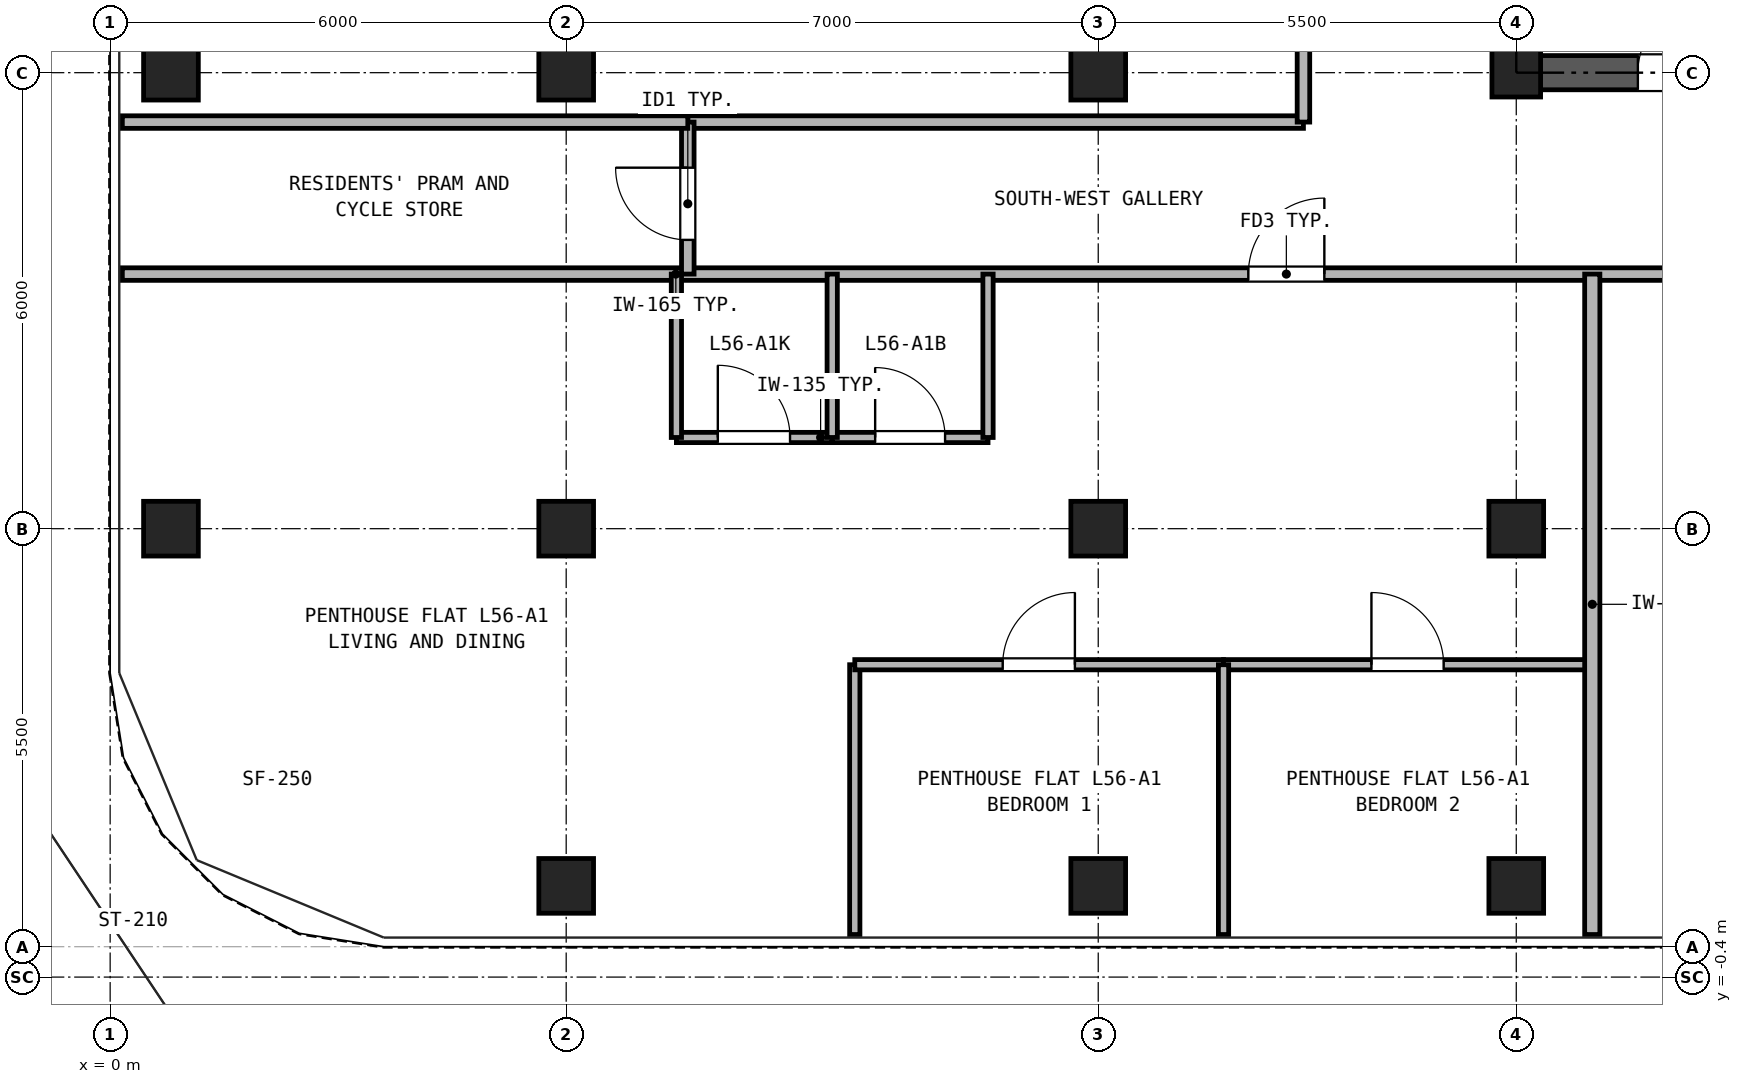
"""IFC4 building model, lengths in metres.
Left out: names, types, materials, properties, quantities, classifications, styles, units other than length and angle.
Written with IfcOpenShell. Run it as: python <this file> out.ifc"""

import sys

from ifc_helpers import new_model, si_unit, direction, frame, frame_2d, origin, origin_2d, place, context, subcontext, project, spatial, rectangle, hollow_rectangle, extrude, source, transform, mapped, element, fill, save


model = new_model("IFC4")
c1 = context("Model", 3, precision=1e-05, world=origin(), true_north=direction((0.0, 1.0)))
c2 = subcontext(c1, "Body", "Model", "MODEL_VIEW")
j1 = project(units=[si_unit("LENGTHUNIT", "METRE"), si_unit("PLANEANGLEUNIT", "RADIAN")], contexts=[c1])
p1 = place(None, origin())
s1 = spatial("IfcSite", under=j1, at=p1, CompositionType="ELEMENT")
p2 = place(p1, origin())
s2 = spatial("IfcBuilding", under=s1, at=p2, CompositionType="ELEMENT")
p3 = place(p2, frame((0.0, 0.0, 199.6)))
s3 = spatial("IfcBuildingStorey", under=s2, at=p3, CompositionType="ELEMENT", Elevation=199.6)
m1 = source(origin(), c2, "Body", "SweptSolid", [
    extrude(hollow_rectangle(XDim=0.72, YDim=0.72, WallThickness=0.04, at=origin_2d()), origin(), (0.0, 0.0, 1.0), 2.95),
])
for number, where, z_axis, x_axis in (
    (1, (6.0, 0.8, 0.0), (0.0, 0.0, 1.0), (1.0, 0.0, 0.0)),
    (2, (13.0, 0.8, 0.0), (0.0, 0.0, 1.0), (1.0, 0.0, 0.0)),
    (3, (18.5, 0.8, 0.0), (0.0, 0.0, 1.0), (1.0, 0.0, 0.0)),
    (4, (0.8, 5.5, 0.0), (0.0, 0.0, 1.0), (1.0, 0.0, 0.0)),
    (5, (0.8, 11.5, 0.0), (0.0, 0.0, 1.0), (1.0, 0.0, 0.0)),
    (6, (6.0, 5.5, 0.0), (0.0, 0.0, 1.0), (1.0, 0.0, 0.0)),
    (7, (6.0, 11.5, 0.0), (0.0, 0.0, 1.0), (1.0, 0.0, 0.0)),
    (8, (13.0, 5.5, 0.0), (0.0, 0.0, 1.0), (1.0, 0.0, 0.0)),
    (9, (13.0, 11.5, 0.0), (0.0, 0.0, 1.0), (1.0, 0.0, 0.0)),
    (10, (18.5, 5.5, 0.0), (0.0, 0.0, 1.0), (1.0, 0.0, 0.0)),
):
    element("IfcColumn", number, at=place(p3, frame(where, z_axis=z_axis, x_axis=x_axis)), inside=s3, PredefinedType="COLUMN", context=c2, shape_type="MappedRepresentation", body=[
        mapped(m1, transform((0.0, 0.0, 0.0), x_axis=(1.0, 0.0, 0.0), y_axis=(0.0, 1.0, 0.0), z_axis=(0.0, 0.0, 1.0), scale=1.0)),
    ])
m2 = source(origin(), c2, "Body", "SweptSolid", [
    extrude(hollow_rectangle(XDim=0.64, YDim=0.64, WallThickness=0.035, at=origin_2d()), origin(), (0.0, 0.0, 1.0), 2.95),
])
p4 = place(p3, frame((18.5, 11.5, 0.0), z_axis=(0.0, 0.0, 1.0), x_axis=(1.0, 0.0, 0.0)))
e11 = element("IfcColumn", 11, at=p4, inside=s3, PredefinedType="COLUMN", context=c2, shape_type="MappedRepresentation", body=[
    mapped(m2, transform((0.0, 0.0, 0.0), x_axis=(1.0, 0.0, 0.0), y_axis=(0.0, 1.0, 0.0), z_axis=(0.0, 0.0, 1.0), scale=1.0)),
])
p5 = place(p3, frame((18.275, 11.5, 0.0), z_axis=(0.0, 0.0, 1.0), x_axis=(1.0, 0.0, 0.0)))
e12 = element("IfcWall", 12, at=p5, inside=s3, PredefinedType="SHEAR", context=c2, shape_type="SweptSolid", body=[
    extrude(rectangle(XDim=10.45, YDim=0.45, at=frame_2d((5.225, 0.0))), origin(), (0.0, 0.0, 1.0), 2.95),
])
p6 = place(p5, frame((1.825, 0.0, 0.0)))
e13 = element("IfcOpeningElement", 13, at=p6, cuts=e12, PredefinedType="OPENING", context=c2, shape_type="SweptSolid", body=[
    extrude(rectangle(XDim=0.95, YDim=2.15, at=frame_2d((0.475, 1.075))), frame((0.0, 0.235, 0.0), z_axis=(0.0, -1.0, 0.0), x_axis=(1.0, 0.0, 0.0)), (0.0, 0.0, 1.0), 0.47),
])
p7 = place(p5, frame((5.325, 0.0, 0.0)))
e14 = element("IfcOpeningElement", 14, at=p7, cuts=e12, PredefinedType="OPENING", context=c2, shape_type="SweptSolid", body=[
    extrude(rectangle(XDim=0.95, YDim=2.15, at=frame_2d((0.475, 1.075))), frame((0.0, 0.235, 0.0), z_axis=(0.0, -1.0, 0.0), x_axis=(1.0, 0.0, 0.0)), (0.0, 0.0, 1.0), 0.47),
])
p8 = place(p5, frame((8.225, 0.0, 0.0)))
e15 = element("IfcOpeningElement", 15, at=p8, cuts=e12, PredefinedType="OPENING", context=c2, shape_type="SweptSolid", body=[
    extrude(rectangle(XDim=1.1, YDim=2.25, at=frame_2d((0.55, 1.125))), frame((0.0, 0.235, 0.0), z_axis=(0.0, -1.0, 0.0), x_axis=(1.0, 0.0, 0.0)), (0.0, 0.0, 1.0), 0.47),
])
p9 = place(p3, frame((18.5, 11.725, 0.0), z_axis=(0.0, 0.0, 1.0), x_axis=(0.0, 1.0, 0.0)))
e16 = element("IfcWall", 16, at=p9, inside=s3, PredefinedType="SHEAR", context=c2, shape_type="SweptSolid", body=[
    extrude(rectangle(XDim=16.8, YDim=0.45, at=frame_2d((8.4, 0.0))), origin(), (0.0, 0.0, 1.0), 2.95),
])
p10 = place(p9, frame((7.425, 0.0, 0.0)))
e17 = element("IfcOpeningElement", 17, at=p10, cuts=e16, PredefinedType="OPENING", context=c2, shape_type="SweptSolid", body=[
    extrude(rectangle(XDim=1.15, YDim=2.2, at=frame_2d((0.575, 1.1))), frame((0.0, 0.235, 0.0), z_axis=(0.0, -1.0, 0.0), x_axis=(1.0, 0.0, 0.0)), (0.0, 0.0, 1.0), 0.47),
])
p11 = place(p3, frame((0.16, 8.85, 0.0), z_axis=(0.0, 0.0, 1.0), x_axis=(1.0, 0.0, 0.0)))
e18 = element("IfcWall", 18, at=p11, inside=s3, PredefinedType="PARTITIONING", context=c2, shape_type="SweptSolid", body=[
    extrude(rectangle(XDim=41.48, YDim=0.165, at=frame_2d((20.74, 0.0))), origin(), (0.0, 0.0, 1.0), 2.95),
])
p12 = place(p11, frame((14.815, 0.0, 0.0)))
e19 = element("IfcOpeningElement", 19, at=p12, cuts=e18, PredefinedType="OPENING", context=c2, shape_type="SweptSolid", body=[
    extrude(rectangle(XDim=1.0, YDim=2.15, at=frame_2d((0.5, 1.075))), frame((0.0, 0.093, 0.0), z_axis=(0.0, -1.0, 0.0), x_axis=(1.0, 0.0, 0.0)), (0.0, 0.0, 1.0), 0.185),
])
p13 = place(p11, frame((28.315, 0.0, 0.0)))
e20 = element("IfcOpeningElement", 20, at=p13, cuts=e18, PredefinedType="OPENING", context=c2, shape_type="SweptSolid", body=[
    extrude(rectangle(XDim=1.0, YDim=2.15, at=frame_2d((0.5, 1.075))), frame((0.0, 0.093, 0.0), z_axis=(0.0, -1.0, 0.0), x_axis=(1.0, 0.0, 0.0)), (0.0, 0.0, 1.0), 0.185),
])
p14 = place(p11, frame((32.615, 0.0, 0.0)))
e21 = element("IfcOpeningElement", 21, at=p14, cuts=e18, PredefinedType="OPENING", context=c2, shape_type="SweptSolid", body=[
    extrude(rectangle(XDim=1.0, YDim=2.15, at=frame_2d((0.5, 1.075))), frame((0.0, 0.093, 0.0), z_axis=(0.0, -1.0, 0.0), x_axis=(1.0, 0.0, 0.0)), (0.0, 0.0, 1.0), 0.185),
])
p15 = place(p3, frame((7.6, 10.85, 0.0), z_axis=(0.0, 0.0, 1.0), x_axis=(1.0, 0.0, 0.0)))
e22 = element("IfcWall", 22, at=p15, inside=s3, PredefinedType="PARTITIONING", context=c2, shape_type="SweptSolid", body=[
    extrude(rectangle(XDim=8.1, YDim=0.165, at=frame_2d((4.05, 0.0))), origin(), (0.0, 0.0, 1.0), 2.95),
])
p16 = place(p3, frame((7.6, 8.85, 0.0), z_axis=(0.0, 0.0, 1.0), x_axis=(0.0, 1.0, 0.0)))
e23 = element("IfcWall", 23, at=p16, inside=s3, PredefinedType="PARTITIONING", context=c2, shape_type="SweptSolid", body=[
    extrude(rectangle(XDim=2.0, YDim=0.165, at=frame_2d((1.0, 0.0))), origin(), (0.0, 0.0, 1.0), 2.95),
])
p17 = place(p16, frame((0.45, 0.0, 0.0)))
e24 = element("IfcOpeningElement", 24, at=p17, cuts=e23, PredefinedType="OPENING", context=c2, shape_type="SweptSolid", body=[
    extrude(rectangle(XDim=0.95, YDim=2.15, at=frame_2d((0.475, 1.075))), frame((0.0, 0.093, 0.0), z_axis=(0.0, -1.0, 0.0), x_axis=(1.0, 0.0, 0.0)), (0.0, 0.0, 1.0), 0.185),
])
p18 = place(p3, frame((15.7, 10.85, 0.0), z_axis=(0.0, 0.0, 1.0), x_axis=(0.0, 1.0, 0.0)))
e25 = element("IfcWall", 25, at=p18, inside=s3, PredefinedType="PARTITIONING", context=c2, shape_type="SweptSolid", body=[
    extrude(rectangle(XDim=24.29, YDim=0.165, at=frame_2d((12.145, 0.0))), origin(), (0.0, 0.0, 1.0), 2.95),
])
p19 = place(p18, frame((2.825, 0.0, 0.0)))
e26 = element("IfcOpeningElement", 26, at=p19, cuts=e25, PredefinedType="OPENING", context=c2, shape_type="SweptSolid", body=[
    extrude(rectangle(XDim=0.95, YDim=2.15, at=frame_2d((0.475, 1.075))), frame((0.0, 0.093, 0.0), z_axis=(0.0, -1.0, 0.0), x_axis=(1.0, 0.0, 0.0)), (0.0, 0.0, 1.0), 0.185),
])
p20 = place(p18, frame((9.15, 0.0, 0.0)))
e27 = element("IfcOpeningElement", 27, at=p20, cuts=e25, PredefinedType="OPENING", context=c2, shape_type="SweptSolid", body=[
    extrude(rectangle(XDim=0.95, YDim=2.15, at=frame_2d((0.475, 1.075))), frame((0.0, 0.093, 0.0), z_axis=(0.0, -1.0, 0.0), x_axis=(1.0, 0.0, 0.0)), (0.0, 0.0, 1.0), 0.185),
])
p21 = place(p18, frame((15.15, 0.0, 0.0)))
e28 = element("IfcOpeningElement", 28, at=p21, cuts=e25, PredefinedType="OPENING", context=c2, shape_type="SweptSolid", body=[
    extrude(rectangle(XDim=0.95, YDim=2.15, at=frame_2d((0.475, 1.075))), frame((0.0, 0.093, 0.0), z_axis=(0.0, -1.0, 0.0), x_axis=(1.0, 0.0, 0.0)), (0.0, 0.0, 1.0), 0.185),
])
p22 = place(p18, frame((20.97, 0.0, 0.0)))
e29 = element("IfcOpeningElement", 29, at=p22, cuts=e25, PredefinedType="OPENING", context=c2, shape_type="SweptSolid", body=[
    extrude(rectangle(XDim=0.95, YDim=2.15, at=frame_2d((0.475, 1.075))), frame((0.0, 0.093, 0.0), z_axis=(0.0, -1.0, 0.0), x_axis=(1.0, 0.0, 0.0)), (0.0, 0.0, 1.0), 0.185),
])
p23 = place(p3, frame((7.45, 6.7, 0.0), z_axis=(0.0, 0.0, 1.0), x_axis=(1.0, 0.0, 0.0)))
e30 = element("IfcWall", 30, at=p23, inside=s3, PredefinedType="PARTITIONING", context=c2, shape_type="SweptSolid", body=[
    extrude(rectangle(XDim=2.05, YDim=0.135, at=frame_2d((1.025, 0.0))), origin(), (0.0, 0.0, 1.0), 2.95),
])
p24 = place(p23, frame((0.545, 0.0, 0.0)))
e31 = element("IfcOpeningElement", 31, at=p24, cuts=e30, PredefinedType="OPENING", context=c2, shape_type="SweptSolid", body=[
    extrude(rectangle(XDim=0.95, YDim=2.15, at=frame_2d((0.475, 1.075))), frame((0.0, 0.077, 0.0), z_axis=(0.0, -1.0, 0.0), x_axis=(1.0, 0.0, 0.0)), (0.0, 0.0, 1.0), 0.155),
])
p25 = place(p3, frame((9.5, 6.7, 0.0), z_axis=(0.0, 0.0, 1.0), x_axis=(1.0, 0.0, 0.0)))
e32 = element("IfcWall", 32, at=p25, inside=s3, PredefinedType="PARTITIONING", context=c2, shape_type="SweptSolid", body=[
    extrude(rectangle(XDim=2.05, YDim=0.135, at=frame_2d((1.025, 0.0))), origin(), (0.0, 0.0, 1.0), 2.95),
])
p26 = place(p25, frame((0.565, 0.0, 0.0)))
e33 = element("IfcOpeningElement", 33, at=p26, cuts=e32, PredefinedType="OPENING", context=c2, shape_type="SweptSolid", body=[
    extrude(rectangle(XDim=0.92, YDim=2.1, at=frame_2d((0.46, 1.05))), frame((0.0, 0.077, 0.0), z_axis=(0.0, -1.0, 0.0), x_axis=(1.0, 0.0, 0.0)), (0.0, 0.0, 1.0), 0.155),
])
for number, where, z_axis, x_axis in (
    (34, (7.45, 6.7, 0.0), (0.0, 0.0, 1.0), (0.0, 1.0, 0.0)),
    (35, (9.5, 6.7, 0.0), (0.0, 0.0, 1.0), (0.0, 1.0, 0.0)),
    (36, (11.55, 6.7, 0.0), (0.0, 0.0, 1.0), (0.0, 1.0, 0.0)),
):
    element("IfcWall", number, at=place(p3, frame(where, z_axis=z_axis, x_axis=x_axis)), inside=s3, PredefinedType="PARTITIONING", context=c2, shape_type="SweptSolid", body=[
        extrude(rectangle(XDim=2.15, YDim=0.135, at=frame_2d((1.075, 0.0))), origin(), (0.0, 0.0, 1.0), 2.95),
    ])
p27 = place(p3, frame((9.797, 0.16, 0.0), z_axis=(0.0, 0.0, 1.0), x_axis=(0.0, 1.0, 0.0)))
e37 = element("IfcWall", 37, at=p27, inside=s3, PredefinedType="PARTITIONING", context=c2, shape_type="SweptSolid", body=[
    extrude(rectangle(XDim=3.55, YDim=0.135, at=frame_2d((1.775, 0.0))), origin(), (0.0, 0.0, 1.0), 2.95),
])
p28 = place(p3, frame((9.797, 3.71, 0.0), z_axis=(0.0, 0.0, 1.0), x_axis=(1.0, 0.0, 0.0)))
e38 = element("IfcWall", 38, at=p28, inside=s3, PredefinedType="PARTITIONING", context=c2, shape_type="SweptSolid", body=[
    extrude(rectangle(XDim=4.851, YDim=0.135, at=frame_2d((2.426, 0.0))), origin(), (0.0, 0.0, 1.0), 2.95),
])
p29 = place(p28, frame((1.946, 0.0, 0.0)))
e39 = element("IfcOpeningElement", 39, at=p29, cuts=e38, PredefinedType="OPENING", context=c2, shape_type="SweptSolid", body=[
    extrude(rectangle(XDim=0.95, YDim=2.15, at=frame_2d((0.475, 1.075))), frame((0.0, 0.077, 0.0), z_axis=(0.0, -1.0, 0.0), x_axis=(1.0, 0.0, 0.0)), (0.0, 0.0, 1.0), 0.155),
])
p30 = place(p3, frame((14.648, 3.71, 0.0), z_axis=(0.0, 0.0, 1.0), x_axis=(1.0, 0.0, 0.0)))
e40 = element("IfcWall", 40, at=p30, inside=s3, PredefinedType="PARTITIONING", context=c2, shape_type="SweptSolid", body=[
    extrude(rectangle(XDim=4.852, YDim=0.135, at=frame_2d((2.426, 0.0))), origin(), (0.0, 0.0, 1.0), 2.95),
])
p31 = place(p30, frame((1.946, 0.0, 0.0)))
e41 = element("IfcOpeningElement", 41, at=p31, cuts=e40, PredefinedType="OPENING", context=c2, shape_type="SweptSolid", body=[
    extrude(rectangle(XDim=0.95, YDim=2.15, at=frame_2d((0.475, 1.075))), frame((0.0, 0.077, 0.0), z_axis=(0.0, -1.0, 0.0), x_axis=(1.0, 0.0, 0.0)), (0.0, 0.0, 1.0), 0.155),
])
p32 = place(p3, frame((14.648, 0.16, 0.0), z_axis=(0.0, 0.0, 1.0), x_axis=(0.0, 1.0, 0.0)))
e42 = element("IfcWall", 42, at=p32, inside=s3, PredefinedType="PARTITIONING", context=c2, shape_type="SweptSolid", body=[
    extrude(rectangle(XDim=3.55, YDim=0.135, at=frame_2d((1.775, 0.0))), origin(), (0.0, 0.0, 1.0), 2.95),
])
p33 = place(p3, frame((19.5, 0.16, 0.0), z_axis=(0.0, 0.0, 1.0), x_axis=(0.0, 1.0, 0.0)))
e43 = element("IfcWall", 43, at=p33, inside=s3, PredefinedType="PARTITIONING", context=c2, shape_type="SweptSolid", body=[
    extrude(rectangle(XDim=8.69, YDim=0.2, at=frame_2d((4.345, 0.0))), origin(), (0.0, 0.0, 1.0), 2.95),
])
p34 = place(p3, frame((0.16, 10.85, 0.0), z_axis=(0.0, 0.0, 1.0), x_axis=(1.0, 0.0, 0.0)))
e44 = element("IfcWall", 44, at=p34, inside=s3, PredefinedType="PARTITIONING", context=c2, shape_type="SweptSolid", body=[
    extrude(rectangle(XDim=7.44, YDim=0.165, at=frame_2d((3.72, 0.0))), origin(), (0.0, 0.0, 1.0), 2.95),
])
p35 = place(p6, frame((0.95, 0.0, 0.0), z_axis=(0.0, 0.0, 1.0), x_axis=(-1.0, 0.0, 0.0)))
e45 = element("IfcDoor", 45, at=p35, inside=s3, OperationType="SINGLE_SWING_RIGHT", PredefinedType="DOOR", context=c2, shape_type="SweptSolid", body=[
    extrude(rectangle(XDim=0.95, YDim=2.15, at=frame_2d((0.475, 1.075))), frame((0.0, 0.025, 0.0), z_axis=(0.0, -1.0, 0.0), x_axis=(1.0, 0.0, 0.0)), (0.0, 0.0, 1.0), 0.05),
])
fill(e13, e45)
p36 = place(p24, origin())
e46 = element("IfcDoor", 46, at=p36, inside=s3, OperationType="SINGLE_SWING_LEFT", PredefinedType="DOOR", context=c2, shape_type="SweptSolid", body=[
    extrude(rectangle(XDim=0.95, YDim=2.15, at=frame_2d((0.475, 1.075))), frame((0.0, 0.025, 0.0), z_axis=(0.0, -1.0, 0.0), x_axis=(1.0, 0.0, 0.0)), (0.0, 0.0, 1.0), 0.05),
])
fill(e31, e46)
p37 = place(p26, origin())
e47 = element("IfcDoor", 47, at=p37, inside=s3, OperationType="SINGLE_SWING_LEFT", PredefinedType="DOOR", context=c2, shape_type="SweptSolid", body=[
    extrude(rectangle(XDim=0.92, YDim=2.1, at=frame_2d((0.46, 1.05))), frame((0.0, 0.025, 0.0), z_axis=(0.0, -1.0, 0.0), x_axis=(1.0, 0.0, 0.0)), (0.0, 0.0, 1.0), 0.05),
])
fill(e33, e47)
p38 = place(p29, frame((0.95, 0.0, 0.0), z_axis=(0.0, 0.0, 1.0), x_axis=(-1.0, 0.0, 0.0)))
e48 = element("IfcDoor", 48, at=p38, inside=s3, OperationType="SINGLE_SWING_RIGHT", PredefinedType="DOOR", context=c2, shape_type="SweptSolid", body=[
    extrude(rectangle(XDim=0.95, YDim=2.15, at=frame_2d((0.475, 1.075))), frame((0.0, 0.025, 0.0), z_axis=(0.0, -1.0, 0.0), x_axis=(1.0, 0.0, 0.0)), (0.0, 0.0, 1.0), 0.05),
])
fill(e39, e48)
p39 = place(p31, frame((0.95, 0.0, 0.0), z_axis=(0.0, 0.0, 1.0), x_axis=(-1.0, 0.0, 0.0)))
e49 = element("IfcDoor", 49, at=p39, inside=s3, OperationType="SINGLE_SWING_LEFT", PredefinedType="DOOR", context=c2, shape_type="SweptSolid", body=[
    extrude(rectangle(XDim=0.95, YDim=2.15, at=frame_2d((0.475, 1.075))), frame((0.0, 0.025, 0.0), z_axis=(0.0, -1.0, 0.0), x_axis=(1.0, 0.0, 0.0)), (0.0, 0.0, 1.0), 0.05),
])
fill(e41, e49)
p40 = place(p12, frame((1.0, 0.0, 0.0), z_axis=(0.0, 0.0, 1.0), x_axis=(-1.0, 0.0, 0.0)))
e50 = element("IfcDoor", 50, at=p40, inside=s3, OperationType="SINGLE_SWING_RIGHT", PredefinedType="DOOR", context=c2, shape_type="SweptSolid", body=[
    extrude(rectangle(XDim=1.0, YDim=2.15, at=frame_2d((0.5, 1.075))), frame((0.0, 0.025, 0.0), z_axis=(0.0, -1.0, 0.0), x_axis=(1.0, 0.0, 0.0)), (0.0, 0.0, 1.0), 0.05),
])
fill(e19, e50)
p41 = place(p17, frame((0.95, 0.0, 0.0), z_axis=(0.0, 0.0, 1.0), x_axis=(-1.0, 0.0, 0.0)))
e51 = element("IfcDoor", 51, at=p41, inside=s3, OperationType="SINGLE_SWING_RIGHT", PredefinedType="DOOR", context=c2, shape_type="SweptSolid", body=[
    extrude(rectangle(XDim=0.95, YDim=2.15, at=frame_2d((0.475, 1.075))), frame((0.0, 0.025, 0.0), z_axis=(0.0, -1.0, 0.0), x_axis=(1.0, 0.0, 0.0)), (0.0, 0.0, 1.0), 0.05),
])
fill(e24, e51)
save(model, sys.argv[1])
